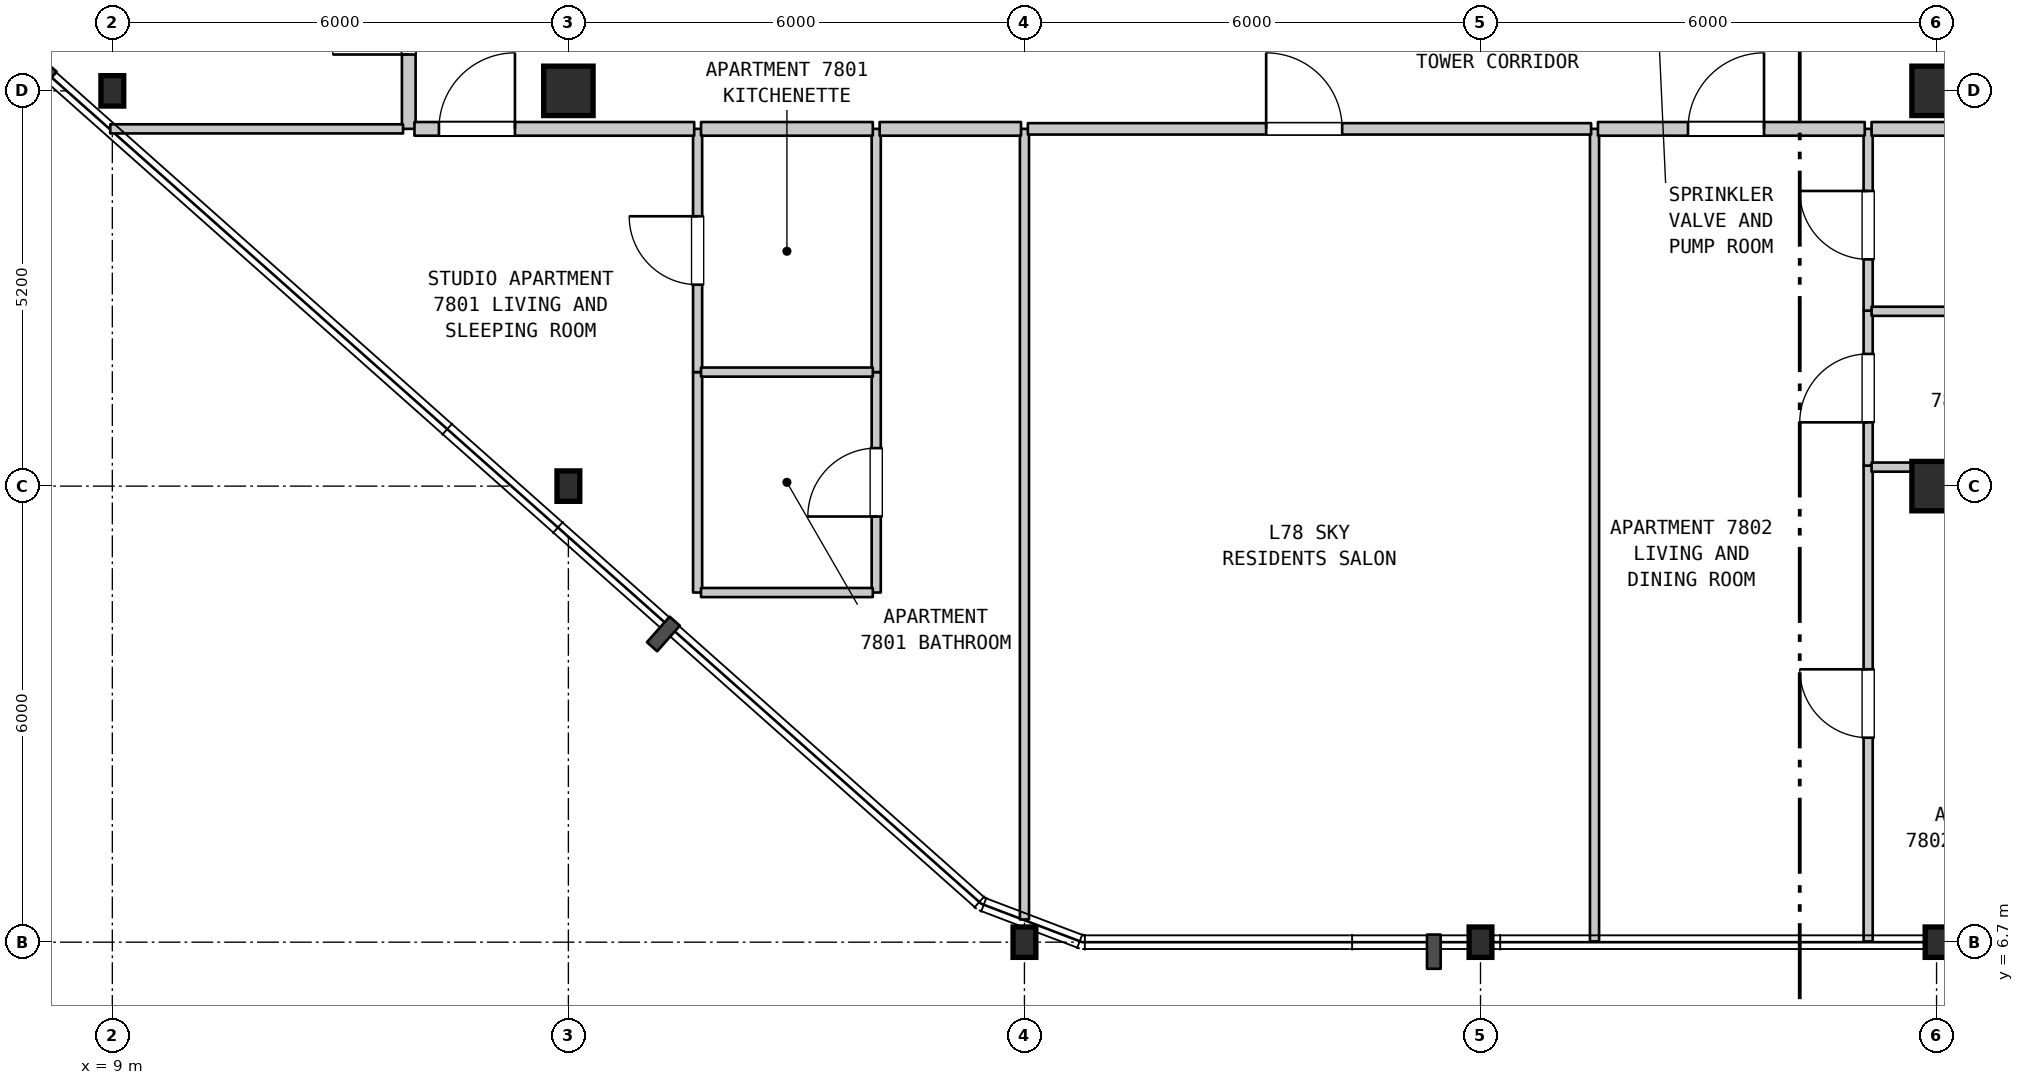
"""IFC4 building model, lengths in metres.
Left out: names, types, materials, properties, quantities, classifications, styles, units other than length and angle.
Written with IfcOpenShell. Run it as: python <this file> out.ifc"""

import sys

from ifc_helpers import new_model, si_unit, direction, frame, frame_2d, origin, origin_2d, place, context, subcontext, project, spatial, rectangle, i_section, extrude, element, fill, save


model = new_model("IFC4")
c1 = context("Model", 3, precision=1e-05, world=origin(), true_north=direction((0.0, 1.0)))
c2 = subcontext(c1, "Body", "Model", "MODEL_VIEW")
j1 = project(units=[si_unit("LENGTHUNIT", "METRE"), si_unit("PLANEANGLEUNIT", "RADIAN")], contexts=[c1])
p1 = place(None, origin())
s1 = spatial("IfcSite", under=j1, at=p1, CompositionType="ELEMENT")
p2 = place(p1, origin())
s2 = spatial("IfcBuilding", under=s1, at=p2, CompositionType="ELEMENT")
p3 = place(p2, frame((0.0, 0.0, 311.0)))
s3 = spatial("IfcBuildingStorey", under=s2, at=p3, CompositionType="ELEMENT", Elevation=311.0)
for number, where, z_axis, x_axis in (
    (1, (9.0, 17.9, 0.0), (0.0, 0.0, 1.0), (1.0, 0.0, 0.0)),
    (2, (15.0, 12.7, 0.0), (0.0, 0.0, 1.0), (1.0, 0.0, 0.0)),
):
    element("IfcColumn", number, at=place(p3, frame(where, z_axis=z_axis, x_axis=x_axis)), inside=s3, PredefinedType="COLUMN", context=c2, shape_type="SweptSolid", body=[
        extrude(i_section(OverallWidth=0.3, OverallDepth=0.4, WebThickness=0.013, FlangeThickness=0.024, FilletRadius=0.027, at=origin_2d()), origin(), (0.0, 0.0, 1.0), 3.7),
    ])
p4 = place(p3, frame((15.0, 17.9, 0.0), z_axis=(0.0, 0.0, 1.0), x_axis=(1.0, 0.0, 0.0)))
e3 = element("IfcColumn", 3, at=p4, inside=s3, PredefinedType="COLUMN", context=c2, shape_type="SweptSolid", body=[
    extrude(rectangle(XDim=0.65, YDim=0.65, at=origin_2d()), origin(), (0.0, 0.0, 1.0), 3.7),
])
for number, where, z_axis, x_axis in (
    (4, (21.0, 6.7, 0.0), (0.0, 0.0, 1.0), (1.0, 0.0, 0.0)),
    (5, (27.0, 6.7, 0.0), (0.0, 0.0, 1.0), (1.0, 0.0, 0.0)),
    (6, (33.0, 6.7, 0.0), (0.0, 0.0, 1.0), (1.0, 0.0, 0.0)),
):
    element("IfcColumn", number, at=place(p3, frame(where, z_axis=z_axis, x_axis=x_axis)), inside=s3, PredefinedType="COLUMN", context=c2, shape_type="SweptSolid", body=[
        extrude(i_section(OverallWidth=0.3, OverallDepth=0.4, WebThickness=0.013, FlangeThickness=0.024, FilletRadius=0.027, at=origin_2d()), origin(), (0.0, 0.0, 1.0), 3.7),
    ])
for number, where, z_axis, x_axis in (
    (7, (33.0, 12.7, 0.0), (0.0, 0.0, 1.0), (1.0, 0.0, 0.0)),
    (8, (33.0, 17.9, 0.0), (0.0, 0.0, 1.0), (1.0, 0.0, 0.0)),
):
    element("IfcColumn", number, at=place(p3, frame(where, z_axis=z_axis, x_axis=x_axis)), inside=s3, PredefinedType="COLUMN", context=c2, shape_type="SweptSolid", body=[
        extrude(rectangle(XDim=0.65, YDim=0.65, at=origin_2d()), origin(), (0.0, 0.0, 1.0), 3.7),
    ])
p5 = place(p3, frame((12.9, 17.4, 0.0), z_axis=(0.0, 0.0, 1.0), x_axis=(0.0, 1.0, 0.0)))
e9 = element("IfcWall", 9, at=p5, inside=s3, PredefinedType="STANDARD", context=c2, shape_type="SweptSolid", body=[
    extrude(rectangle(XDim=3.1, YDim=0.18, at=frame_2d((1.55, 0.0))), origin(), (0.0, 0.0, 1.0), 3.28),
])
p6 = place(p5, frame((0.978, 0.0, 0.0)))
e10 = element("IfcOpeningElement", 10, at=p6, cuts=e9, PredefinedType="OPENING", context=c2, shape_type="SweptSolid", body=[
    extrude(rectangle(XDim=1.0, YDim=2.15, at=frame_2d((0.5, 1.075))), frame((0.0, 0.1, 0.0), z_axis=(0.0, -1.0, 0.0), x_axis=(1.0, 0.0, 0.0)), (0.0, 0.0, 1.0), 0.2),
])
p7 = place(p3, frame((16.7, 11.3, 0.0), z_axis=(0.0, 0.0, 1.0), x_axis=(0.0, 1.0, 0.0)))
e11 = element("IfcWall", 11, at=p7, inside=s3, PredefinedType="PARTITIONING", context=c2, shape_type="SweptSolid", body=[
    extrude(rectangle(XDim=2.9, YDim=0.12, at=frame_2d((1.45, 0.0))), origin(), (0.0, 0.0, 1.0), 3.28),
])
p8 = place(p3, frame((16.7, 14.2, 0.0), z_axis=(0.0, 0.0, 1.0), x_axis=(0.0, 1.0, 0.0)))
e12 = element("IfcWall", 12, at=p8, inside=s3, PredefinedType="PARTITIONING", context=c2, shape_type="SweptSolid", body=[
    extrude(rectangle(XDim=3.2, YDim=0.12, at=frame_2d((1.6, 0.0))), origin(), (0.0, 0.0, 1.0), 3.28),
])
p9 = place(p8, frame((1.15, 0.0, 0.0)))
e13 = element("IfcOpeningElement", 13, at=p9, cuts=e12, PredefinedType="OPENING", context=c2, shape_type="SweptSolid", body=[
    extrude(rectangle(XDim=0.9, YDim=2.15, at=frame_2d((0.45, 1.075))), frame((0.0, 0.07, 0.0), z_axis=(0.0, -1.0, 0.0), x_axis=(1.0, 0.0, 0.0)), (0.0, 0.0, 1.0), 0.14),
])
p10 = place(p3, frame((19.05, 11.3, 0.0), z_axis=(0.0, 0.0, 1.0), x_axis=(0.0, 1.0, 0.0)))
e14 = element("IfcWall", 14, at=p10, inside=s3, PredefinedType="PARTITIONING", context=c2, shape_type="SweptSolid", body=[
    extrude(rectangle(XDim=2.9, YDim=0.12, at=frame_2d((1.45, 0.0))), origin(), (0.0, 0.0, 1.0), 3.28),
])
p11 = place(p10, frame((1.0, 0.0, 0.0)))
e15 = element("IfcOpeningElement", 15, at=p11, cuts=e14, PredefinedType="OPENING", context=c2, shape_type="SweptSolid", body=[
    extrude(rectangle(XDim=0.9, YDim=2.1, at=frame_2d((0.45, 1.05))), frame((0.0, 0.07, 0.0), z_axis=(0.0, -1.0, 0.0), x_axis=(1.0, 0.0, 0.0)), (0.0, 0.0, 1.0), 0.14),
])
p12 = place(p3, frame((19.05, 14.2, 0.0), z_axis=(0.0, 0.0, 1.0), x_axis=(0.0, 1.0, 0.0)))
e16 = element("IfcWall", 16, at=p12, inside=s3, PredefinedType="PARTITIONING", context=c2, shape_type="SweptSolid", body=[
    extrude(rectangle(XDim=3.2, YDim=0.12, at=frame_2d((1.6, 0.0))), origin(), (0.0, 0.0, 1.0), 3.28),
])
p13 = place(p3, frame((21.0, 6.999, 0.0), z_axis=(0.0, 0.0, 1.0), x_axis=(0.0, 1.0, 0.0)))
e17 = element("IfcWall", 17, at=p13, inside=s3, PredefinedType="PARTITIONING", context=c2, shape_type="SweptSolid", body=[
    extrude(rectangle(XDim=10.401, YDim=0.12, at=frame_2d((5.2, 0.0))), origin(), (0.0, 0.0, 1.0), 3.28),
])
p14 = place(p3, frame((28.5, 6.71, 0.0), z_axis=(0.0, 0.0, 1.0), x_axis=(0.0, 1.0, 0.0)))
e18 = element("IfcWall", 18, at=p14, inside=s3, PredefinedType="PARTITIONING", context=c2, shape_type="SweptSolid", body=[
    extrude(rectangle(XDim=10.69, YDim=0.12, at=frame_2d((5.345, 0.0))), origin(), (0.0, 0.0, 1.0), 3.28),
])
p15 = place(p3, frame((32.1, 6.71, 0.0), z_axis=(0.0, 0.0, 1.0), x_axis=(0.0, 1.0, 0.0)))
e19 = element("IfcWall", 19, at=p15, inside=s3, PredefinedType="PARTITIONING", context=c2, shape_type="SweptSolid", body=[
    extrude(rectangle(XDim=6.26, YDim=0.12, at=frame_2d((3.13, 0.0))), origin(), (0.0, 0.0, 1.0), 3.28),
])
p16 = place(p15, frame((2.68, 0.0, 0.0)))
e20 = element("IfcOpeningElement", 20, at=p16, cuts=e19, PredefinedType="OPENING", context=c2, shape_type="SweptSolid", body=[
    extrude(rectangle(XDim=0.9, YDim=2.15, at=frame_2d((0.45, 1.075))), frame((0.0, 0.07, 0.0), z_axis=(0.0, -1.0, 0.0), x_axis=(1.0, 0.0, 0.0)), (0.0, 0.0, 1.0), 0.14),
])
p17 = place(p3, frame((32.1, 12.97, 0.0), z_axis=(0.0, 0.0, 1.0), x_axis=(0.0, 1.0, 0.0)))
e21 = element("IfcWall", 21, at=p17, inside=s3, PredefinedType="PARTITIONING", context=c2, shape_type="SweptSolid", body=[
    extrude(rectangle(XDim=2.038, YDim=0.12, at=frame_2d((1.019, 0.0))), origin(), (0.0, 0.0, 1.0), 3.28),
])
p18 = place(p17, frame((0.569, 0.0, 0.0)))
e22 = element("IfcOpeningElement", 22, at=p18, cuts=e21, PredefinedType="OPENING", context=c2, shape_type="SweptSolid", body=[
    extrude(rectangle(XDim=0.9, YDim=2.15, at=frame_2d((0.45, 1.075))), frame((0.0, 0.07, 0.0), z_axis=(0.0, -1.0, 0.0), x_axis=(1.0, 0.0, 0.0)), (0.0, 0.0, 1.0), 0.14),
])
p19 = place(p3, frame((32.1, 15.008, 0.0), z_axis=(0.0, 0.0, 1.0), x_axis=(0.0, 1.0, 0.0)))
e23 = element("IfcWall", 23, at=p19, inside=s3, PredefinedType="PARTITIONING", context=c2, shape_type="SweptSolid", body=[
    extrude(rectangle(XDim=2.392, YDim=0.12, at=frame_2d((1.196, 0.0))), origin(), (0.0, 0.0, 1.0), 3.28),
])
p20 = place(p19, frame((0.675, 0.0, 0.0)))
e24 = element("IfcOpeningElement", 24, at=p20, cuts=e23, PredefinedType="OPENING", context=c2, shape_type="SweptSolid", body=[
    extrude(rectangle(XDim=0.9, YDim=2.1, at=frame_2d((0.45, 1.05))), frame((0.0, 0.07, 0.0), z_axis=(0.0, -1.0, 0.0), x_axis=(1.0, 0.0, 0.0)), (0.0, 0.0, 1.0), 0.14),
])
p21 = place(p3, frame((16.745, 11.3, 0.0), z_axis=(0.0, 0.0, 1.0), x_axis=(1.0, 0.0, 0.0)))
e25 = element("IfcWall", 25, at=p21, inside=s3, PredefinedType="PARTITIONING", context=c2, shape_type="SweptSolid", body=[
    extrude(rectangle(XDim=2.26, YDim=0.12, at=frame_2d((1.13, 0.0))), origin(), (0.0, 0.0, 1.0), 3.28),
])
p22 = place(p3, frame((32.145, 12.95, 0.0), z_axis=(0.0, 0.0, 1.0), x_axis=(1.0, 0.0, 0.0)))
e26 = element("IfcWall", 26, at=p22, inside=s3, PredefinedType="PARTITIONING", context=c2, shape_type="SweptSolid", body=[
    extrude(rectangle(XDim=2.85, YDim=0.12, at=frame_2d((1.425, 0.0))), origin(), (0.0, 0.0, 1.0), 3.28),
])
p23 = place(p3, frame((16.745, 14.2, 0.0), z_axis=(0.0, 0.0, 1.0), x_axis=(1.0, 0.0, 0.0)))
e27 = element("IfcWall", 27, at=p23, inside=s3, PredefinedType="PARTITIONING", context=c2, shape_type="SweptSolid", body=[
    extrude(rectangle(XDim=2.26, YDim=0.12, at=frame_2d((1.13, 0.0))), origin(), (0.0, 0.0, 1.0), 3.28),
])
p24 = place(p3, frame((32.145, 15.0, 0.0), z_axis=(0.0, 0.0, 1.0), x_axis=(1.0, 0.0, 0.0)))
e28 = element("IfcWall", 28, at=p24, inside=s3, PredefinedType="PARTITIONING", context=c2, shape_type="SweptSolid", body=[
    extrude(rectangle(XDim=2.85, YDim=0.12, at=frame_2d((1.425, 0.0))), origin(), (0.0, 0.0, 1.0), 3.28),
])
p25 = place(p3, frame((8.973, 17.4, 0.0), z_axis=(0.0, 0.0, 1.0), x_axis=(1.0, 0.0, 0.0)))
e29 = element("IfcWall", 29, at=p25, inside=s3, PredefinedType="PARTITIONING", context=c2, shape_type="SweptSolid", body=[
    extrude(rectangle(XDim=3.852, YDim=0.12, at=frame_2d((1.926, 0.0))), origin(), (0.0, 0.0, 1.0), 3.28),
])
p26 = place(p3, frame((12.975, 17.4, 0.0), z_axis=(0.0, 0.0, 1.0), x_axis=(1.0, 0.0, 0.0)))
e30 = element("IfcWall", 30, at=p26, inside=s3, PredefinedType="STANDARD", context=c2, shape_type="SweptSolid", body=[
    extrude(rectangle(XDim=3.68, YDim=0.18, at=frame_2d((1.84, 0.0))), origin(), (0.0, 0.0, 1.0), 3.28),
])
p27 = place(p26, frame((0.322, 0.0, 0.0)))
e31 = element("IfcOpeningElement", 31, at=p27, cuts=e30, PredefinedType="OPENING", context=c2, shape_type="SweptSolid", body=[
    extrude(rectangle(XDim=1.0, YDim=2.15, at=frame_2d((0.5, 1.075))), frame((0.0, 0.1, 0.0), z_axis=(0.0, -1.0, 0.0), x_axis=(1.0, 0.0, 0.0)), (0.0, 0.0, 1.0), 0.2),
])
p28 = place(p3, frame((16.745, 17.4, 0.0), z_axis=(0.0, 0.0, 1.0), x_axis=(1.0, 0.0, 0.0)))
e32 = element("IfcWall", 32, at=p28, inside=s3, PredefinedType="STANDARD", context=c2, shape_type="SweptSolid", body=[
    extrude(rectangle(XDim=2.26, YDim=0.18, at=frame_2d((1.13, 0.0))), origin(), (0.0, 0.0, 1.0), 3.28),
])
p29 = place(p3, frame((19.095, 17.4, 0.0), z_axis=(0.0, 0.0, 1.0), x_axis=(1.0, 0.0, 0.0)))
e33 = element("IfcWall", 33, at=p29, inside=s3, PredefinedType="STANDARD", context=c2, shape_type="SweptSolid", body=[
    extrude(rectangle(XDim=1.86, YDim=0.18, at=frame_2d((0.93, 0.0))), origin(), (0.0, 0.0, 1.0), 3.28),
])
p30 = place(p3, frame((21.045, 17.4, 0.0), z_axis=(0.0, 0.0, 1.0), x_axis=(1.0, 0.0, 0.0)))
e34 = element("IfcWall", 34, at=p30, inside=s3, PredefinedType="STANDARD", context=c2, shape_type="SweptSolid", body=[
    extrude(rectangle(XDim=7.41, YDim=0.15, at=frame_2d((3.705, 0.0))), origin(), (0.0, 0.0, 1.0), 3.28),
])
p31 = place(p30, frame((3.135, 0.0, 0.0)))
e35 = element("IfcOpeningElement", 35, at=p31, cuts=e34, PredefinedType="OPENING", context=c2, shape_type="SweptSolid", body=[
    extrude(rectangle(XDim=1.0, YDim=2.15, at=frame_2d((0.5, 1.075))), frame((0.0, 0.085, 0.0), z_axis=(0.0, -1.0, 0.0), x_axis=(1.0, 0.0, 0.0)), (0.0, 0.0, 1.0), 0.17),
])
p32 = place(p3, frame((28.545, 17.4, 0.0), z_axis=(0.0, 0.0, 1.0), x_axis=(1.0, 0.0, 0.0)))
e36 = element("IfcWall", 36, at=p32, inside=s3, PredefinedType="STANDARD", context=c2, shape_type="SweptSolid", body=[
    extrude(rectangle(XDim=3.51, YDim=0.18, at=frame_2d((1.755, 0.0))), origin(), (0.0, 0.0, 1.0), 3.28),
])
p33 = place(p32, frame((1.185, 0.0, 0.0)))
e37 = element("IfcOpeningElement", 37, at=p33, cuts=e36, PredefinedType="OPENING", context=c2, shape_type="SweptSolid", body=[
    extrude(rectangle(XDim=1.0, YDim=2.15, at=frame_2d((0.5, 1.075))), frame((0.0, 0.1, 0.0), z_axis=(0.0, -1.0, 0.0), x_axis=(1.0, 0.0, 0.0)), (0.0, 0.0, 1.0), 0.2),
])
p34 = place(p3, frame((32.145, 17.4, 0.0), z_axis=(0.0, 0.0, 1.0), x_axis=(1.0, 0.0, 0.0)))
e38 = element("IfcWall", 38, at=p34, inside=s3, PredefinedType="STANDARD", context=c2, shape_type="SweptSolid", body=[
    extrude(rectangle(XDim=2.85, YDim=0.18, at=frame_2d((1.425, 0.0))), origin(), (0.0, 0.0, 1.0), 3.28),
])
p35 = place(p6, origin())
e39 = element("IfcDoor", 39, at=p35, inside=s3, OperationType="SINGLE_SWING_LEFT", PredefinedType="DOOR", context=c2, shape_type="SweptSolid", body=[
    extrude(rectangle(XDim=1.0, YDim=2.15, at=frame_2d((0.5, 1.075))), frame((0.0, 0.025, 0.0), z_axis=(0.0, -1.0, 0.0), x_axis=(1.0, 0.0, 0.0)), (0.0, 0.0, 1.0), 0.05),
])
fill(e10, e39)
p36 = place(p9, origin())
e40 = element("IfcDoor", 40, at=p36, inside=s3, OperationType="SINGLE_SWING_RIGHT", PredefinedType="DOOR", context=c2, shape_type="SweptSolid", body=[
    extrude(rectangle(XDim=0.9, YDim=2.15, at=frame_2d((0.45, 1.075))), frame((0.0, 0.025, 0.0), z_axis=(0.0, -1.0, 0.0), x_axis=(1.0, 0.0, 0.0)), (0.0, 0.0, 1.0), 0.05),
])
fill(e13, e40)
p37 = place(p11, origin())
e41 = element("IfcDoor", 41, at=p37, inside=s3, OperationType="SINGLE_SWING_LEFT", PredefinedType="DOOR", context=c2, shape_type="SweptSolid", body=[
    extrude(rectangle(XDim=0.9, YDim=2.1, at=frame_2d((0.45, 1.05))), frame((0.0, 0.025, 0.0), z_axis=(0.0, -1.0, 0.0), x_axis=(1.0, 0.0, 0.0)), (0.0, 0.0, 1.0), 0.05),
])
fill(e15, e41)
p38 = place(p16, origin())
e42 = element("IfcDoor", 42, at=p38, inside=s3, OperationType="SINGLE_SWING_RIGHT", PredefinedType="DOOR", context=c2, shape_type="SweptSolid", body=[
    extrude(rectangle(XDim=0.9, YDim=2.15, at=frame_2d((0.45, 1.075))), frame((0.0, 0.025, 0.0), z_axis=(0.0, -1.0, 0.0), x_axis=(1.0, 0.0, 0.0)), (0.0, 0.0, 1.0), 0.05),
])
fill(e20, e42)
p39 = place(p18, origin())
e43 = element("IfcDoor", 43, at=p39, inside=s3, OperationType="SINGLE_SWING_LEFT", PredefinedType="DOOR", context=c2, shape_type="SweptSolid", body=[
    extrude(rectangle(XDim=0.9, YDim=2.15, at=frame_2d((0.45, 1.075))), frame((0.0, 0.025, 0.0), z_axis=(0.0, -1.0, 0.0), x_axis=(1.0, 0.0, 0.0)), (0.0, 0.0, 1.0), 0.05),
])
fill(e22, e43)
p40 = place(p20, origin())
e44 = element("IfcDoor", 44, at=p40, inside=s3, OperationType="SINGLE_SWING_RIGHT", PredefinedType="DOOR", context=c2, shape_type="SweptSolid", body=[
    extrude(rectangle(XDim=0.9, YDim=2.1, at=frame_2d((0.45, 1.05))), frame((0.0, 0.025, 0.0), z_axis=(0.0, -1.0, 0.0), x_axis=(1.0, 0.0, 0.0)), (0.0, 0.0, 1.0), 0.05),
])
fill(e24, e44)
p41 = place(p27, origin())
e45 = element("IfcDoor", 45, at=p41, inside=s3, OperationType="SINGLE_SWING_RIGHT", PredefinedType="DOOR", context=c2, shape_type="SweptSolid", body=[
    extrude(rectangle(XDim=1.0, YDim=2.15, at=frame_2d((0.5, 1.075))), frame((0.0, 0.025, 0.0), z_axis=(0.0, -1.0, 0.0), x_axis=(1.0, 0.0, 0.0)), (0.0, 0.0, 1.0), 0.05),
])
fill(e31, e45)
p42 = place(p31, origin())
e46 = element("IfcDoor", 46, at=p42, inside=s3, OperationType="SINGLE_SWING_LEFT", PredefinedType="DOOR", context=c2, shape_type="SweptSolid", body=[
    extrude(rectangle(XDim=1.0, YDim=2.15, at=frame_2d((0.5, 1.075))), frame((0.0, 0.025, 0.0), z_axis=(0.0, -1.0, 0.0), x_axis=(1.0, 0.0, 0.0)), (0.0, 0.0, 1.0), 0.05),
])
fill(e35, e46)
p43 = place(p33, origin())
e47 = element("IfcDoor", 47, at=p43, inside=s3, OperationType="SINGLE_SWING_RIGHT", PredefinedType="DOOR", context=c2, shape_type="SweptSolid", body=[
    extrude(rectangle(XDim=1.0, YDim=2.15, at=frame_2d((0.5, 1.075))), frame((0.0, 0.025, 0.0), z_axis=(0.0, -1.0, 0.0), x_axis=(1.0, 0.0, 0.0)), (0.0, 0.0, 1.0), 0.05),
])
fill(e37, e47)
save(model, sys.argv[1])
